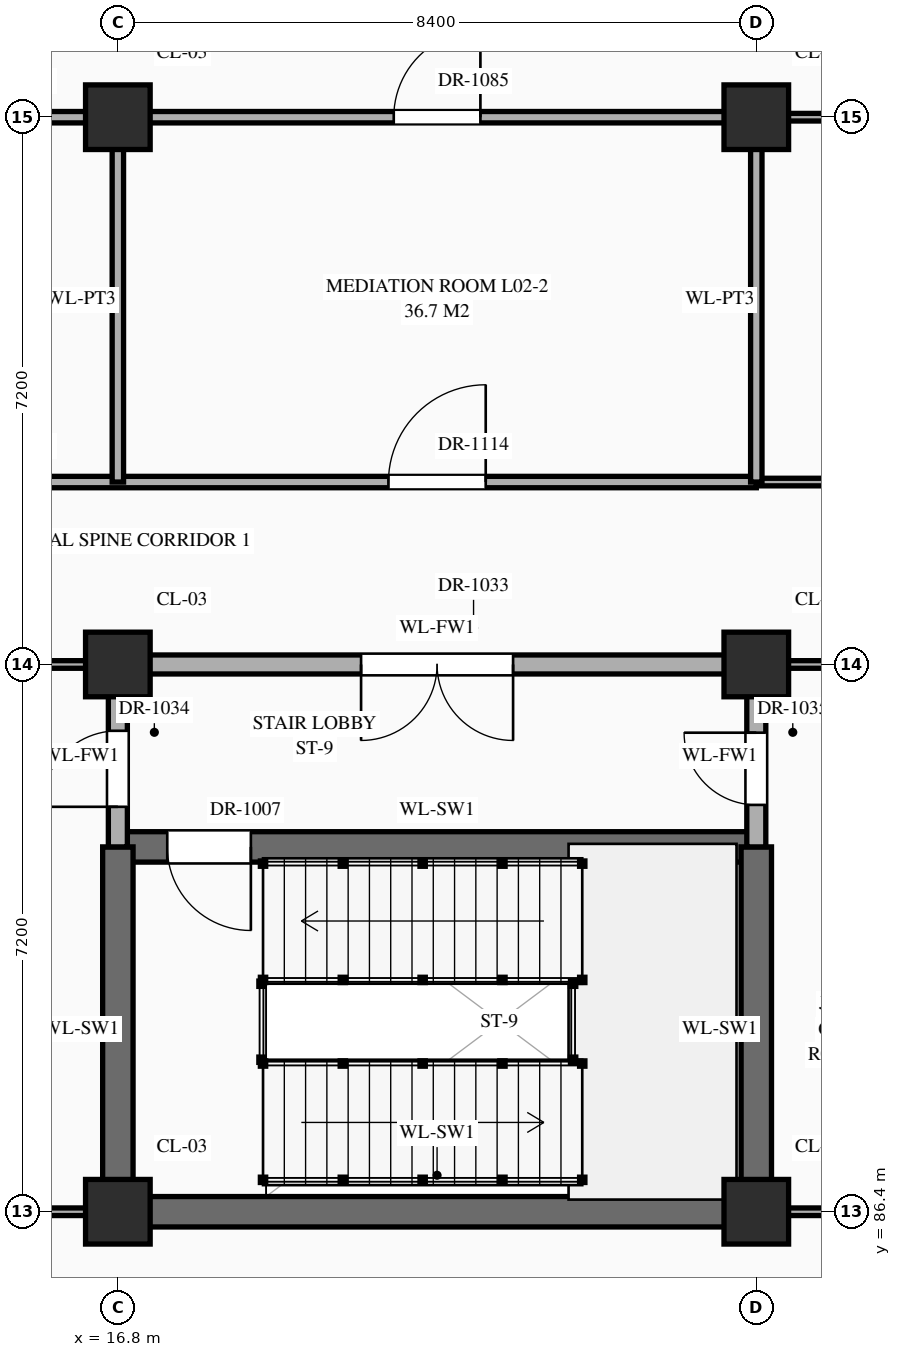
"""IFC4 building model, lengths in metres.
Left out: names, types, materials, properties, quantities, classifications, styles, units other than length and angle.
Written with IfcOpenShell. Run it as: python <this file> out.ifc"""

import sys

from ifc_helpers import new_model, si_unit, direction, frame, frame_2d, origin, origin_2d, place, context, subcontext, project, spatial, rectangle, extrude, element, fill, save


model = new_model("IFC4")
c1 = context("Model", 3, precision=1e-05, world=origin(), true_north=direction((0.0, 1.0)))
c2 = subcontext(c1, "Body", "Model", "MODEL_VIEW")
j1 = project(units=[si_unit("LENGTHUNIT", "METRE"), si_unit("PLANEANGLEUNIT", "RADIAN")], contexts=[c1])
p1 = place(None, origin())
s1 = spatial("IfcSite", under=j1, at=p1, CompositionType="ELEMENT")
p2 = place(p1, origin())
s2 = spatial("IfcBuilding", under=s1, at=p2, CompositionType="ELEMENT")
p3 = place(p2, frame((0.0, 0.0, 5.4)))
s3 = spatial("IfcBuildingStorey", under=s2, at=p3, CompositionType="ELEMENT", Elevation=5.4)
for number, where, z_axis, x_axis in (
    (1, (16.8, 86.4, 0.0), (0.0, 0.0, 1.0), (1.0, 0.0, 0.0)),
    (2, (16.8, 93.6, 0.0), (0.0, 0.0, 1.0), (1.0, 0.0, 0.0)),
    (3, (16.8, 100.8, 0.0), (0.0, 0.0, 1.0), (1.0, 0.0, 0.0)),
    (4, (25.2, 86.4, 0.0), (0.0, 0.0, 1.0), (1.0, 0.0, 0.0)),
    (5, (25.2, 93.6, 0.0), (0.0, 0.0, 1.0), (1.0, 0.0, 0.0)),
    (6, (25.2, 100.8, 0.0), (0.0, 0.0, 1.0), (1.0, 0.0, 0.0)),
):
    element("IfcColumn", number, at=place(p3, frame(where, z_axis=z_axis, x_axis=x_axis)), inside=s3, PredefinedType="COLUMN", context=c2, shape_type="SweptSolid", body=[
        extrude(rectangle(XDim=0.85, YDim=0.85, at=origin_2d()), origin(), (0.0, 0.0, 1.0), 5.4),
    ])
p4 = place(p3, frame((0.04, 86.4, 0.0), z_axis=(0.0, 0.0, 1.0), x_axis=(1.0, 0.0, 0.0)))
e7 = element("IfcWall", 7, at=p4, inside=s3, PredefinedType="STANDARD", context=c2, shape_type="SweptSolid", body=[
    extrude(rectangle(XDim=16.76, YDim=0.1, at=frame_2d((8.38, 0.0))), origin(), (0.0, 0.0, 1.0), 4.27),
])
p5 = place(p4, frame((0.972, 0.0, 0.0)))
e8 = element("IfcOpeningElement", 8, at=p5, cuts=e7, PredefinedType="OPENING", context=c2, shape_type="SweptSolid", body=[
    extrude(rectangle(XDim=1.12, YDim=2.25, at=frame_2d((0.56, 1.125))), frame((0.0, 0.062, 0.0), z_axis=(0.0, -1.0, 0.0), x_axis=(1.0, 0.0, 0.0)), (0.0, 0.0, 1.0), 0.124),
])
p6 = place(p4, frame((3.26, 0.0, 0.0)))
e9 = element("IfcOpeningElement", 9, at=p6, cuts=e7, PredefinedType="OPENING", context=c2, shape_type="SweptSolid", body=[
    extrude(rectangle(XDim=1.8, YDim=2.5, at=frame_2d((0.9, 1.25))), frame((0.0, 0.062, 0.0), z_axis=(0.0, -1.0, 0.0), x_axis=(1.0, 0.0, 0.0)), (0.0, 0.0, 1.0), 0.124),
])
p7 = place(p4, frame((6.167, 0.0, 0.0)))
e10 = element("IfcOpeningElement", 10, at=p7, cuts=e7, PredefinedType="OPENING", context=c2, shape_type="SweptSolid", body=[
    extrude(rectangle(XDim=1.24, YDim=2.3, at=frame_2d((0.62, 1.15))), frame((0.0, 0.062, 0.0), z_axis=(0.0, -1.0, 0.0), x_axis=(1.0, 0.0, 0.0)), (0.0, 0.0, 1.0), 0.124),
])
p8 = place(p4, frame((11.92, 0.0, 0.0)))
e11 = element("IfcOpeningElement", 11, at=p8, cuts=e7, PredefinedType="OPENING", context=c2, shape_type="SweptSolid", body=[
    extrude(rectangle(XDim=1.28, YDim=2.35, at=frame_2d((0.64, 1.175))), frame((0.0, 0.062, 0.0), z_axis=(0.0, -1.0, 0.0), x_axis=(1.0, 0.0, 0.0)), (0.0, 0.0, 1.0), 0.124),
])
p9 = place(p3, frame((16.8, 86.4, 0.0), z_axis=(0.0, 0.0, 1.0), x_axis=(1.0, 0.0, 0.0)))
e12 = element("IfcWall", 12, at=p9, inside=s3, PredefinedType="SHEAR", context=c2, shape_type="SweptSolid", body=[
    extrude(rectangle(XDim=8.4, YDim=0.4, at=frame_2d((4.2, 0.0))), origin(), (0.0, 0.0, 1.0), 5.12),
])
p10 = place(p3, frame((25.2, 86.4, 0.0), z_axis=(0.0, 0.0, 1.0), x_axis=(1.0, 0.0, 0.0)))
e13 = element("IfcWall", 13, at=p10, inside=s3, PredefinedType="STANDARD", context=c2, shape_type="SweptSolid", body=[
    extrude(rectangle(XDim=16.8, YDim=0.1, at=frame_2d((8.4, 0.0))), origin(), (0.0, 0.0, 1.0), 4.27),
])
p11 = place(p10, frame((1.083, 0.0, 0.0)))
e14 = element("IfcOpeningElement", 14, at=p11, cuts=e13, PredefinedType="OPENING", context=c2, shape_type="SweptSolid", body=[
    extrude(rectangle(XDim=0.98, YDim=2.35, at=frame_2d((0.49, 1.175))), frame((0.0, 0.062, 0.0), z_axis=(0.0, -1.0, 0.0), x_axis=(1.0, 0.0, 0.0)), (0.0, 0.0, 1.0), 0.124),
])
p12 = place(p10, frame((3.3, 0.0, 0.0)))
e15 = element("IfcOpeningElement", 15, at=p12, cuts=e13, PredefinedType="OPENING", context=c2, shape_type="SweptSolid", body=[
    extrude(rectangle(XDim=1.8, YDim=2.5, at=frame_2d((0.9, 1.25))), frame((0.0, 0.062, 0.0), z_axis=(0.0, -1.0, 0.0), x_axis=(1.0, 0.0, 0.0)), (0.0, 0.0, 1.0), 0.124),
])
p13 = place(p10, frame((6.258, 0.0, 0.0)))
e16 = element("IfcOpeningElement", 16, at=p13, cuts=e13, PredefinedType="OPENING", context=c2, shape_type="SweptSolid", body=[
    extrude(rectangle(XDim=1.14, YDim=2.4, at=frame_2d((0.57, 1.2))), frame((0.0, 0.062, 0.0), z_axis=(0.0, -1.0, 0.0), x_axis=(1.0, 0.0, 0.0)), (0.0, 0.0, 1.0), 0.124),
])
p14 = place(p10, frame((12.15, 0.0, 0.0)))
e17 = element("IfcOpeningElement", 17, at=p14, cuts=e13, PredefinedType="OPENING", context=c2, shape_type="SweptSolid", body=[
    extrude(rectangle(XDim=0.9, YDim=2.15, at=frame_2d((0.45, 1.075))), frame((0.0, 0.062, 0.0), z_axis=(0.0, -1.0, 0.0), x_axis=(1.0, 0.0, 0.0)), (0.0, 0.0, 1.0), 0.124),
])
p15 = place(p3, frame((16.8, 91.2, 0.0), z_axis=(0.0, 0.0, 1.0), x_axis=(1.0, 0.0, 0.0)))
e18 = element("IfcWall", 18, at=p15, inside=s3, PredefinedType="SHEAR", context=c2, shape_type="SweptSolid", body=[
    extrude(rectangle(XDim=8.4, YDim=0.4, at=frame_2d((4.2, 0.0))), origin(), (0.0, 0.0, 1.0), 5.12),
])
p16 = place(p15, frame((0.65, 0.0, 0.0)))
e19 = element("IfcOpeningElement", 19, at=p16, cuts=e18, PredefinedType="OPENING", context=c2, shape_type="SweptSolid", body=[
    extrude(rectangle(XDim=1.1, YDim=2.2, at=frame_2d((0.55, 1.1))), frame((0.0, 0.212, 0.0), z_axis=(0.0, -1.0, 0.0), x_axis=(1.0, 0.0, 0.0)), (0.0, 0.0, 1.0), 0.424),
])
p17 = place(p3, frame((0.04, 93.6, 0.0), z_axis=(0.0, 0.0, 1.0), x_axis=(1.0, 0.0, 0.0)))
e20 = element("IfcWall", 20, at=p17, inside=s3, PredefinedType="STANDARD", context=c2, shape_type="SweptSolid", body=[
    extrude(rectangle(XDim=16.76, YDim=0.1, at=frame_2d((8.38, 0.0))), origin(), (0.0, 0.0, 1.0), 4.27),
])
p18 = place(p17, frame((1.083, 0.0, 0.0)))
e21 = element("IfcOpeningElement", 21, at=p18, cuts=e20, PredefinedType="OPENING", context=c2, shape_type="SweptSolid", body=[
    extrude(rectangle(XDim=0.9, YDim=2.15, at=frame_2d((0.45, 1.075))), frame((0.0, 0.062, 0.0), z_axis=(0.0, -1.0, 0.0), x_axis=(1.0, 0.0, 0.0)), (0.0, 0.0, 1.0), 0.124),
])
p19 = place(p17, frame((3.335, 0.0, 0.0)))
e22 = element("IfcOpeningElement", 22, at=p19, cuts=e20, PredefinedType="OPENING", context=c2, shape_type="SweptSolid", body=[
    extrude(rectangle(XDim=1.65, YDim=2.4, at=frame_2d((0.825, 1.2))), frame((0.0, 0.062, 0.0), z_axis=(0.0, -1.0, 0.0), x_axis=(1.0, 0.0, 0.0)), (0.0, 0.0, 1.0), 0.124),
])
p20 = place(p17, frame((6.327, 0.0, 0.0)))
e23 = element("IfcOpeningElement", 23, at=p20, cuts=e20, PredefinedType="OPENING", context=c2, shape_type="SweptSolid", body=[
    extrude(rectangle(XDim=0.92, YDim=2.15, at=frame_2d((0.46, 1.075))), frame((0.0, 0.062, 0.0), z_axis=(0.0, -1.0, 0.0), x_axis=(1.0, 0.0, 0.0)), (0.0, 0.0, 1.0), 0.124),
])
p21 = place(p17, frame((12.08, 0.0, 0.0)))
e24 = element("IfcOpeningElement", 24, at=p21, cuts=e20, PredefinedType="OPENING", context=c2, shape_type="SweptSolid", body=[
    extrude(rectangle(XDim=0.96, YDim=2.2, at=frame_2d((0.48, 1.1))), frame((0.0, 0.062, 0.0), z_axis=(0.0, -1.0, 0.0), x_axis=(1.0, 0.0, 0.0)), (0.0, 0.0, 1.0), 0.124),
])
p22 = place(p3, frame((16.8, 93.6, 0.0), z_axis=(0.0, 0.0, 1.0), x_axis=(1.0, 0.0, 0.0)))
e25 = element("IfcWall", 25, at=p22, inside=s3, PredefinedType="STANDARD", context=c2, shape_type="SweptSolid", body=[
    extrude(rectangle(XDim=8.4, YDim=0.25, at=frame_2d((4.2, 0.0))), origin(), (0.0, 0.0, 1.0), 4.27),
])
p23 = place(p22, frame((3.2, 0.0, 0.0)))
e26 = element("IfcOpeningElement", 26, at=p23, cuts=e25, PredefinedType="OPENING", context=c2, shape_type="SweptSolid", body=[
    extrude(rectangle(XDim=2.0, YDim=2.4, at=frame_2d((1.0, 1.2))), frame((0.0, 0.137, 0.0), z_axis=(0.0, -1.0, 0.0), x_axis=(1.0, 0.0, 0.0)), (0.0, 0.0, 1.0), 0.274),
])
p24 = place(p3, frame((25.2, 93.6, 0.0), z_axis=(0.0, 0.0, 1.0), x_axis=(1.0, 0.0, 0.0)))
e27 = element("IfcWall", 27, at=p24, inside=s3, PredefinedType="STANDARD", context=c2, shape_type="SweptSolid", body=[
    extrude(rectangle(XDim=16.8, YDim=0.1, at=frame_2d((8.4, 0.0))), origin(), (0.0, 0.0, 1.0), 4.27),
])
p25 = place(p24, frame((1.073, 0.0, 0.0)))
e28 = element("IfcOpeningElement", 28, at=p25, cuts=e27, PredefinedType="OPENING", context=c2, shape_type="SweptSolid", body=[
    extrude(rectangle(XDim=1.0, YDim=2.25, at=frame_2d((0.5, 1.125))), frame((0.0, 0.062, 0.0), z_axis=(0.0, -1.0, 0.0), x_axis=(1.0, 0.0, 0.0)), (0.0, 0.0, 1.0), 0.124),
])
p26 = place(p24, frame((3.25, 0.0, 0.0)))
e29 = element("IfcOpeningElement", 29, at=p26, cuts=e27, PredefinedType="OPENING", context=c2, shape_type="SweptSolid", body=[
    extrude(rectangle(XDim=1.9, YDim=2.5, at=frame_2d((0.95, 1.25))), frame((0.0, 0.062, 0.0), z_axis=(0.0, -1.0, 0.0), x_axis=(1.0, 0.0, 0.0)), (0.0, 0.0, 1.0), 0.124),
])
p27 = place(p24, frame((6.288, 0.0, 0.0)))
e30 = element("IfcOpeningElement", 30, at=p27, cuts=e27, PredefinedType="OPENING", context=c2, shape_type="SweptSolid", body=[
    extrude(rectangle(XDim=1.08, YDim=2.25, at=frame_2d((0.54, 1.125))), frame((0.0, 0.062, 0.0), z_axis=(0.0, -1.0, 0.0), x_axis=(1.0, 0.0, 0.0)), (0.0, 0.0, 1.0), 0.124),
])
p28 = place(p24, frame((12.04, 0.0, 0.0)))
e31 = element("IfcOpeningElement", 31, at=p28, cuts=e27, PredefinedType="OPENING", context=c2, shape_type="SweptSolid", body=[
    extrude(rectangle(XDim=1.12, YDim=2.25, at=frame_2d((0.56, 1.125))), frame((0.0, 0.062, 0.0), z_axis=(0.0, -1.0, 0.0), x_axis=(1.0, 0.0, 0.0)), (0.0, 0.0, 1.0), 0.124),
])
p29 = place(p3, frame((5.8, 96.0, 0.0), z_axis=(0.0, 0.0, 1.0), x_axis=(1.0, 0.0, 0.0)))
e32 = element("IfcWall", 32, at=p29, inside=s3, PredefinedType="STANDARD", context=c2, shape_type="SweptSolid", body=[
    extrude(rectangle(XDim=19.4, YDim=0.15, at=frame_2d((9.7, 0.0))), origin(), (0.0, 0.0, 1.0), 5.12),
])
p30 = place(p29, frame((0.7, 0.0, 0.0)))
e33 = element("IfcOpeningElement", 33, at=p30, cuts=e32, PredefinedType="OPENING", context=c2, shape_type="SweptSolid", body=[
    extrude(rectangle(XDim=1.2, YDim=2.35, at=frame_2d((0.6, 1.175))), frame((0.0, 0.087, 0.0), z_axis=(0.0, -1.0, 0.0), x_axis=(1.0, 0.0, 0.0)), (0.0, 0.0, 1.0), 0.174),
])
p31 = place(p29, frame((6.18, 0.0, 0.0)))
e34 = element("IfcOpeningElement", 34, at=p31, cuts=e32, PredefinedType="OPENING", context=c2, shape_type="SweptSolid", body=[
    extrude(rectangle(XDim=1.24, YDim=2.3, at=frame_2d((0.62, 1.15))), frame((0.0, 0.087, 0.0), z_axis=(0.0, -1.0, 0.0), x_axis=(1.0, 0.0, 0.0)), (0.0, 0.0, 1.0), 0.174),
])
p32 = place(p29, frame((14.56, 0.0, 0.0)))
e35 = element("IfcOpeningElement", 35, at=p32, cuts=e32, PredefinedType="OPENING", context=c2, shape_type="SweptSolid", body=[
    extrude(rectangle(XDim=1.28, YDim=2.35, at=frame_2d((0.64, 1.175))), frame((0.0, 0.087, 0.0), z_axis=(0.0, -1.0, 0.0), x_axis=(1.0, 0.0, 0.0)), (0.0, 0.0, 1.0), 0.174),
])
p33 = place(p3, frame((25.2, 96.0, 0.0), z_axis=(0.0, 0.0, 1.0), x_axis=(1.0, 0.0, 0.0)))
e36 = element("IfcWall", 36, at=p33, inside=s3, PredefinedType="STANDARD", context=c2, shape_type="SweptSolid", body=[
    extrude(rectangle(XDim=5.8, YDim=0.1, at=frame_2d((2.9, 0.0))), origin(), (0.0, 0.0, 1.0), 5.12),
])
p34 = place(p33, frame((1.23, 0.0, 0.0)))
e37 = element("IfcOpeningElement", 37, at=p34, cuts=e36, PredefinedType="OPENING", context=c2, shape_type="SweptSolid", body=[
    extrude(rectangle(XDim=0.94, YDim=2.3, at=frame_2d((0.47, 1.15))), frame((0.0, 0.062, 0.0), z_axis=(0.0, -1.0, 0.0), x_axis=(1.0, 0.0, 0.0)), (0.0, 0.0, 1.0), 0.124),
])
p35 = place(p33, frame((4.11, 0.0, 0.0)))
e38 = element("IfcOpeningElement", 38, at=p35, cuts=e36, PredefinedType="OPENING", context=c2, shape_type="SweptSolid", body=[
    extrude(rectangle(XDim=0.98, YDim=2.35, at=frame_2d((0.49, 1.175))), frame((0.0, 0.062, 0.0), z_axis=(0.0, -1.0, 0.0), x_axis=(1.0, 0.0, 0.0)), (0.0, 0.0, 1.0), 0.124),
])
p36 = place(p3, frame((5.8, 100.8, 0.0), z_axis=(0.0, 0.0, 1.0), x_axis=(1.0, 0.0, 0.0)))
e39 = element("IfcWall", 39, at=p36, inside=s3, PredefinedType="STANDARD", context=c2, shape_type="SweptSolid", body=[
    extrude(rectangle(XDim=19.4, YDim=0.15, at=frame_2d((9.7, 0.0))), origin(), (0.0, 0.0, 1.0), 4.27),
])
p37 = place(p36, frame((0.617, 0.0, 0.0)))
e40 = element("IfcOpeningElement", 40, at=p37, cuts=e39, PredefinedType="OPENING", context=c2, shape_type="SweptSolid", body=[
    extrude(rectangle(XDim=1.02, YDim=2.4, at=frame_2d((0.51, 1.2))), frame((0.0, 0.087, 0.0), z_axis=(0.0, -1.0, 0.0), x_axis=(1.0, 0.0, 0.0)), (0.0, 0.0, 1.0), 0.174),
])
p38 = place(p36, frame((6.27, 0.0, 0.0)))
e41 = element("IfcOpeningElement", 41, at=p38, cuts=e39, PredefinedType="OPENING", context=c2, shape_type="SweptSolid", body=[
    extrude(rectangle(XDim=1.06, YDim=2.4, at=frame_2d((0.53, 1.2))), frame((0.0, 0.087, 0.0), z_axis=(0.0, -1.0, 0.0), x_axis=(1.0, 0.0, 0.0)), (0.0, 0.0, 1.0), 0.174),
])
p39 = place(p36, frame((14.63, 0.0, 0.0)))
e42 = element("IfcOpeningElement", 42, at=p39, cuts=e39, PredefinedType="OPENING", context=c2, shape_type="SweptSolid", body=[
    extrude(rectangle(XDim=1.14, YDim=2.4, at=frame_2d((0.57, 1.2))), frame((0.0, 0.087, 0.0), z_axis=(0.0, -1.0, 0.0), x_axis=(1.0, 0.0, 0.0)), (0.0, 0.0, 1.0), 0.174),
])
p40 = place(p3, frame((25.2, 100.8, 0.0), z_axis=(0.0, 0.0, 1.0), x_axis=(1.0, 0.0, 0.0)))
e43 = element("IfcWall", 43, at=p40, inside=s3, PredefinedType="STANDARD", context=c2, shape_type="SweptSolid", body=[
    extrude(rectangle(XDim=5.8, YDim=0.1, at=frame_2d((2.9, 0.0))), origin(), (0.0, 0.0, 1.0), 4.27),
])
p41 = place(p40, frame((1.423, 0.0, 0.0)))
e44 = element("IfcOpeningElement", 44, at=p41, cuts=e43, PredefinedType="OPENING", context=c2, shape_type="SweptSolid", body=[
    extrude(rectangle(XDim=0.9, YDim=2.15, at=frame_2d((0.45, 1.075))), frame((0.0, 0.062, 0.0), z_axis=(0.0, -1.0, 0.0), x_axis=(1.0, 0.0, 0.0)), (0.0, 0.0, 1.0), 0.124),
])
p42 = place(p40, frame((4.17, 0.0, 0.0)))
e45 = element("IfcOpeningElement", 45, at=p42, cuts=e43, PredefinedType="OPENING", context=c2, shape_type="SweptSolid", body=[
    extrude(rectangle(XDim=0.86, YDim=2.1, at=frame_2d((0.43, 1.05))), frame((0.0, 0.062, 0.0), z_axis=(0.0, -1.0, 0.0), x_axis=(1.0, 0.0, 0.0)), (0.0, 0.0, 1.0), 0.124),
])
p43 = place(p3, frame((16.8, 86.4, 0.0), z_axis=(0.0, 0.0, 1.0), x_axis=(0.0, 1.0, 0.0)))
e46 = element("IfcWall", 46, at=p43, inside=s3, PredefinedType="SHEAR", context=c2, shape_type="SweptSolid", body=[
    extrude(rectangle(XDim=4.8, YDim=0.4, at=frame_2d((2.4, 0.0))), origin(), (0.0, 0.0, 1.0), 5.12),
])
p44 = place(p3, frame((16.8, 91.2, 0.0), z_axis=(0.0, 0.0, 1.0), x_axis=(0.0, 1.0, 0.0)))
e47 = element("IfcWall", 47, at=p44, inside=s3, PredefinedType="STANDARD", context=c2, shape_type="SweptSolid", body=[
    extrude(rectangle(XDim=2.4, YDim=0.25, at=frame_2d((1.2, 0.0))), origin(), (0.0, 0.0, 1.0), 4.37),
])
p45 = place(p44, frame((0.528, 0.0, 0.0)))
e48 = element("IfcOpeningElement", 48, at=p45, cuts=e47, PredefinedType="OPENING", context=c2, shape_type="SweptSolid", body=[
    extrude(rectangle(XDim=1.0, YDim=2.2, at=frame_2d((0.5, 1.1))), frame((0.0, 0.137, 0.0), z_axis=(0.0, -1.0, 0.0), x_axis=(1.0, 0.0, 0.0)), (0.0, 0.0, 1.0), 0.274),
])
p46 = place(p3, frame((16.8, 96.0, 0.0), z_axis=(0.0, 0.0, 1.0), x_axis=(0.0, 1.0, 0.0)))
e49 = element("IfcWall", 49, at=p46, inside=s3, PredefinedType="STANDARD", context=c2, shape_type="SweptSolid", body=[
    extrude(rectangle(XDim=4.8, YDim=0.15, at=frame_2d((2.4, 0.0))), origin(), (0.0, 0.0, 1.0), 4.37),
])
p47 = place(p3, frame((25.2, 86.4, 0.0), z_axis=(0.0, 0.0, 1.0), x_axis=(0.0, 1.0, 0.0)))
e50 = element("IfcWall", 50, at=p47, inside=s3, PredefinedType="SHEAR", context=c2, shape_type="SweptSolid", body=[
    extrude(rectangle(XDim=4.8, YDim=0.4, at=frame_2d((2.4, 0.0))), origin(), (0.0, 0.0, 1.0), 5.12),
])
p48 = place(p3, frame((25.2, 91.2, 0.0), z_axis=(0.0, 0.0, 1.0), x_axis=(0.0, 1.0, 0.0)))
e51 = element("IfcWall", 51, at=p48, inside=s3, PredefinedType="STANDARD", context=c2, shape_type="SweptSolid", body=[
    extrude(rectangle(XDim=2.4, YDim=0.25, at=frame_2d((1.2, 0.0))), origin(), (0.0, 0.0, 1.0), 4.37),
])
p49 = place(p48, frame((0.552, 0.0, 0.0)))
e52 = element("IfcOpeningElement", 52, at=p49, cuts=e51, PredefinedType="OPENING", context=c2, shape_type="SweptSolid", body=[
    extrude(rectangle(XDim=0.95, YDim=2.15, at=frame_2d((0.475, 1.075))), frame((0.0, 0.137, 0.0), z_axis=(0.0, -1.0, 0.0), x_axis=(1.0, 0.0, 0.0)), (0.0, 0.0, 1.0), 0.274),
])
p50 = place(p3, frame((25.2, 96.0, 0.0), z_axis=(0.0, 0.0, 1.0), x_axis=(0.0, 1.0, 0.0)))
e53 = element("IfcWall", 53, at=p50, inside=s3, PredefinedType="STANDARD", context=c2, shape_type="SweptSolid", body=[
    extrude(rectangle(XDim=4.8, YDim=0.15, at=frame_2d((2.4, 0.0))), origin(), (0.0, 0.0, 1.0), 4.37),
])
p51 = place(p16, frame((1.1, 0.0, 0.0), z_axis=(0.0, 0.0, 1.0), x_axis=(-1.0, 0.0, 0.0)))
e54 = element("IfcDoor", 54, at=p51, inside=s3, OperationType="SINGLE_SWING_LEFT", PredefinedType="DOOR", context=c2, shape_type="SweptSolid", body=[
    extrude(rectangle(XDim=1.1, YDim=2.2, at=frame_2d((0.55, 1.1))), frame((0.0, 0.025, 0.0), z_axis=(0.0, -1.0, 0.0), x_axis=(1.0, 0.0, 0.0)), (0.0, 0.0, 1.0), 0.05),
])
fill(e19, e54)
p52 = place(p23, frame((2.0, 0.0, 0.0), z_axis=(0.0, 0.0, 1.0), x_axis=(-1.0, 0.0, 0.0)))
e55 = element("IfcDoor", 55, at=p52, inside=s3, OperationType="DOUBLE_DOOR_SINGLE_SWING", PredefinedType="DOOR", context=c2, shape_type="SweptSolid", body=[
    extrude(rectangle(XDim=2.0, YDim=2.4, at=frame_2d((1.0, 1.2))), frame((0.0, 0.025, 0.0), z_axis=(0.0, -1.0, 0.0), x_axis=(1.0, 0.0, 0.0)), (0.0, 0.0, 1.0), 0.05),
])
fill(e26, e55)
p53 = place(p45, origin())
e56 = element("IfcDoor", 56, at=p53, inside=s3, OperationType="SINGLE_SWING_LEFT", PredefinedType="DOOR", context=c2, shape_type="SweptSolid", body=[
    extrude(rectangle(XDim=1.0, YDim=2.2, at=frame_2d((0.5, 1.1))), frame((0.0, 0.025, 0.0), z_axis=(0.0, -1.0, 0.0), x_axis=(1.0, 0.0, 0.0)), (0.0, 0.0, 1.0), 0.05),
])
fill(e48, e56)
p54 = place(p49, origin())
e57 = element("IfcDoor", 57, at=p54, inside=s3, OperationType="SINGLE_SWING_RIGHT", PredefinedType="DOOR", context=c2, shape_type="SweptSolid", body=[
    extrude(rectangle(XDim=0.95, YDim=2.15, at=frame_2d((0.475, 1.075))), frame((0.0, 0.025, 0.0), z_axis=(0.0, -1.0, 0.0), x_axis=(1.0, 0.0, 0.0)), (0.0, 0.0, 1.0), 0.05),
])
fill(e52, e57)
p55 = place(p39, origin())
e58 = element("IfcDoor", 58, at=p55, inside=s3, OperationType="SINGLE_SWING_RIGHT", PredefinedType="DOOR", context=c2, shape_type="SweptSolid", body=[
    extrude(rectangle(XDim=1.14, YDim=2.4, at=frame_2d((0.57, 1.2))), frame((0.0, 0.025, 0.0), z_axis=(0.0, -1.0, 0.0), x_axis=(1.0, 0.0, 0.0)), (0.0, 0.0, 1.0), 0.05),
])
fill(e42, e58)
p56 = place(p32, origin())
e59 = element("IfcDoor", 59, at=p56, inside=s3, OperationType="SINGLE_SWING_RIGHT", PredefinedType="DOOR", context=c2, shape_type="SweptSolid", body=[
    extrude(rectangle(XDim=1.28, YDim=2.35, at=frame_2d((0.64, 1.175))), frame((0.0, 0.025, 0.0), z_axis=(0.0, -1.0, 0.0), x_axis=(1.0, 0.0, 0.0)), (0.0, 0.0, 1.0), 0.05),
])
fill(e35, e59)
save(model, sys.argv[1])
